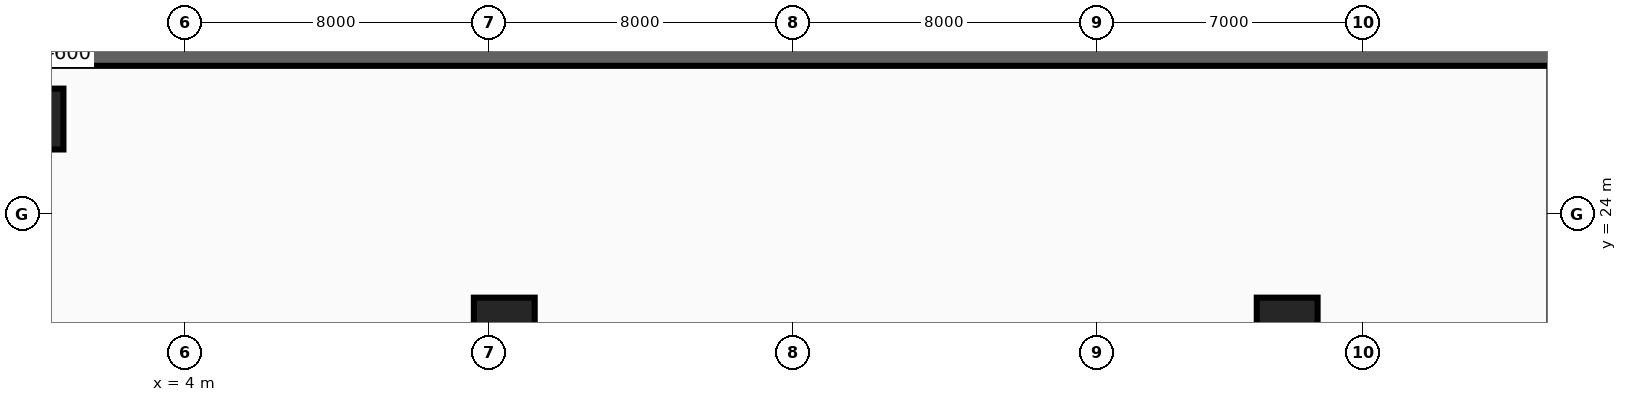
"""IFC4 building model, lengths in metres.
Left out: names, types, materials, properties, quantities, classifications, styles, units other than length and angle.
Written with IfcOpenShell. Run it as: python <this file> out.ifc"""

import sys

from ifc_helpers import new_model, si_unit, direction, frame, frame_2d, origin, origin_2d, place, context, subcontext, project, spatial, rectangle, extrude, source, transform, mapped, element, save


model = new_model("IFC4")
c1 = context("Model", 3, precision=1e-05, world=origin(), true_north=direction((0.0, 1.0)))
c2 = subcontext(c1, "Body", "Model", "MODEL_VIEW")
j1 = project(units=[si_unit("LENGTHUNIT", "METRE"), si_unit("PLANEANGLEUNIT", "RADIAN")], contexts=[c1])
p1 = place(None, origin())
s1 = spatial("IfcSite", under=j1, at=p1, CompositionType="ELEMENT")
p2 = place(p1, origin())
s2 = spatial("IfcBuilding", under=s1, at=p2, CompositionType="ELEMENT")
p3 = place(p2, frame((0.0, 0.0, -4.8)))
s3 = spatial("IfcBuildingStorey", under=s2, at=p3, CompositionType="ELEMENT", Elevation=-4.8)
p4 = place(p3, frame((-40.5, 28.2, 0.0), z_axis=(0.0, 0.0, 1.0), x_axis=(1.0, 0.0, 0.0)))
e1 = element("IfcWall", 1, at=p4, inside=s3, PredefinedType="SOLIDWALL", context=c2, shape_type="SweptSolid", body=[
    extrude(rectangle(XDim=81.0, YDim=0.6, at=frame_2d((40.5, 0.0))), origin(), (0.0, 0.0, 1.0), 4.52),
])
m1 = source(origin(), c2, "Body", "SweptSolid", [
    extrude(rectangle(XDim=1.6, YDim=1.6, at=origin_2d()), origin(), (0.0, 0.0, 1.0), 4.8),
])
for number, where, z_axis, x_axis in (
    (2, (12.4, 21.0, 0.0), (0.0, 0.0, 1.0), (1.0, 0.0, 0.0)),
    (3, (33.0, 21.0, 0.0), (0.0, 0.0, 1.0), (1.0, 0.0, 0.0)),
    (4, (0.0, 26.5, 0.0), (0.0, 0.0, 1.0), (1.0, 0.0, 0.0)),
):
    element("IfcColumn", number, at=place(p3, frame(where, z_axis=z_axis, x_axis=x_axis)), inside=s3, PredefinedType="COLUMN", context=c2, shape_type="MappedRepresentation", body=[
        mapped(m1, transform((0.0, 0.0, 0.0), x_axis=(1.0, 0.0, 0.0), y_axis=(0.0, 1.0, 0.0), z_axis=(0.0, 0.0, 1.0), scale=1.0)),
    ])
save(model, sys.argv[1])
